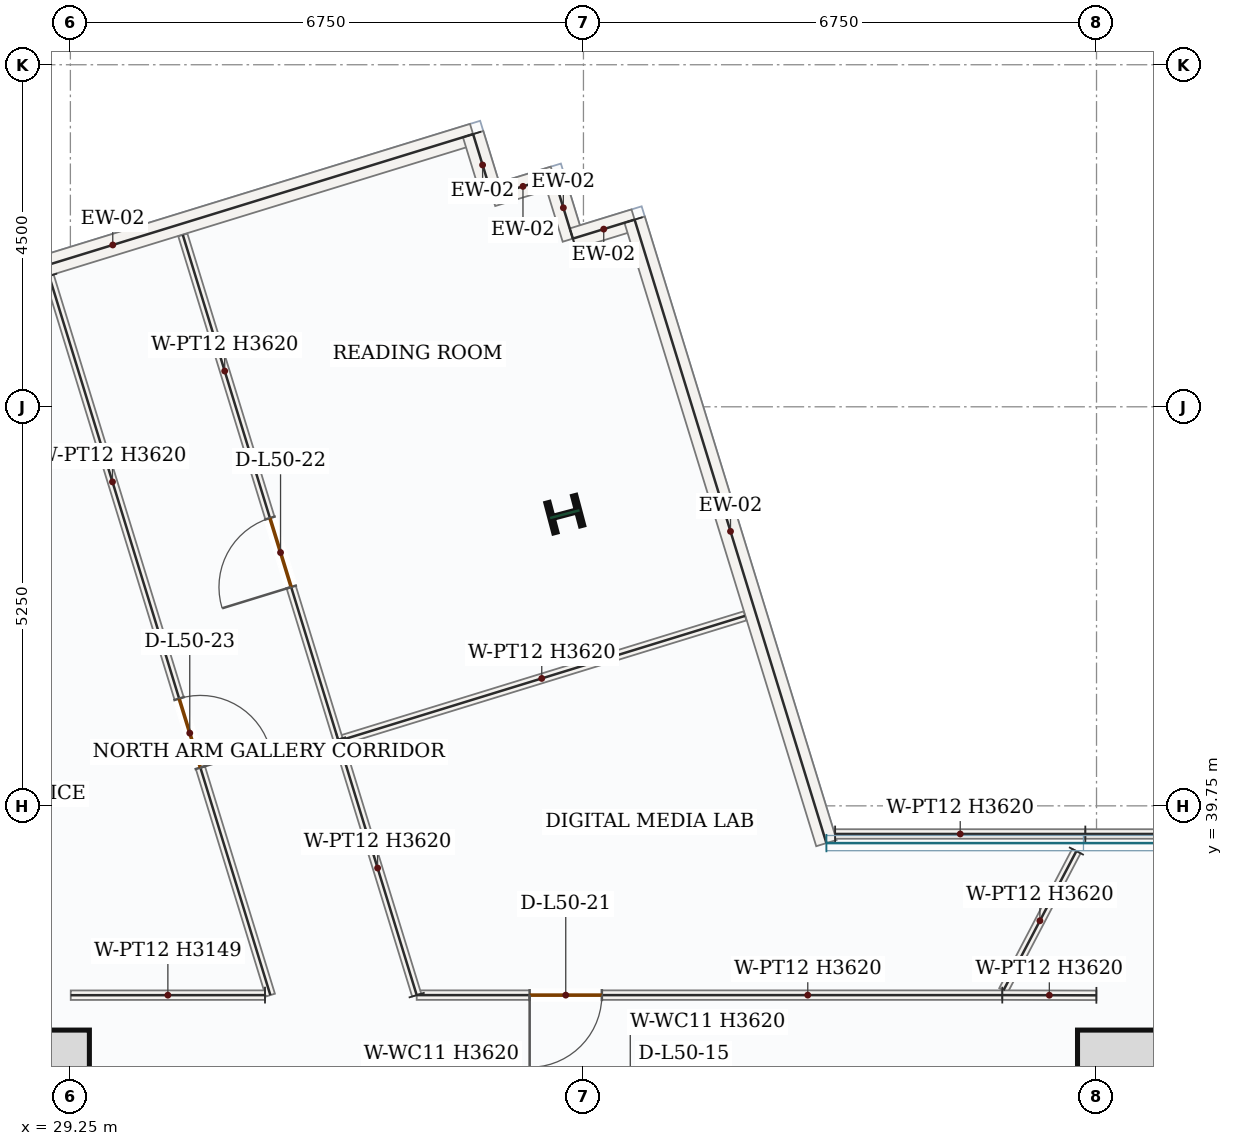
"""IFC4 building model, lengths in metres.
Left out: names, types, materials, properties, quantities, classifications, styles, units other than length and angle.
Written with IfcOpenShell. Run it as: python <this file> out.ifc"""

import sys

from ifc_helpers import new_model, si_unit, direction, frame, frame_2d, origin, origin_2d, place, context, subcontext, project, spatial, rectangle, i_section, extrude, source, transform, mapped, element, fill, save


model = new_model("IFC4")
c1 = context("Model", 3, precision=1e-05, world=origin(), true_north=direction((0.0, 1.0)))
c2 = subcontext(c1, "Body", "Model", "MODEL_VIEW")
j1 = project(units=[si_unit("LENGTHUNIT", "METRE"), si_unit("PLANEANGLEUNIT", "RADIAN")], contexts=[c1])
p1 = place(None, origin())
s1 = spatial("IfcSite", under=j1, at=p1, CompositionType="ELEMENT")
p2 = place(p1, origin())
s2 = spatial("IfcBuilding", under=s1, at=p2, CompositionType="ELEMENT")
p3 = place(p2, frame((0.0, 0.0, 213.6)))
s3 = spatial("IfcBuildingStorey", under=s2, at=p3, CompositionType="ELEMENT", Elevation=213.6)
p4 = place(p3, frame((29.0, 28.05, 0.0), z_axis=(0.0, 0.0, 1.0), x_axis=(0.0, 1.0, 0.0)))
e1 = element("IfcWall", 1, at=p4, inside=s3, PredefinedType="SHEAR", context=c2, shape_type="SweptSolid", body=[
    extrude(rectangle(XDim=8.55, YDim=0.5, at=frame_2d((4.275, 0.0))), origin(), (0.0, 0.0, 1.0), 3.62),
])
p5 = place(p4, frame((1.5, 0.0, 0.0)))
e2 = element("IfcOpeningElement", 2, at=p5, cuts=e1, PredefinedType="OPENING", context=c2, shape_type="SweptSolid", body=[
    extrude(rectangle(XDim=1.1, YDim=2.2, at=frame_2d((0.55, 1.1))), frame((0.0, 0.26, 0.0), z_axis=(0.0, -1.0, 0.0), x_axis=(1.0, 0.0, 0.0)), (0.0, 0.0, 1.0), 0.52),
])
p6 = place(p3, frame((43.0, 28.05, 0.0), z_axis=(0.0, 0.0, 1.0), x_axis=(0.0, 1.0, 0.0)))
e3 = element("IfcWall", 3, at=p6, inside=s3, PredefinedType="SHEAR", context=c2, shape_type="SweptSolid", body=[
    extrude(rectangle(XDim=8.55, YDim=0.5, at=frame_2d((4.275, 0.0))), origin(), (0.0, 0.0, 1.0), 3.62),
])
p7 = place(p6, frame((1.5, 0.0, 0.0)))
e4 = element("IfcOpeningElement", 4, at=p7, cuts=e3, PredefinedType="OPENING", context=c2, shape_type="SweptSolid", body=[
    extrude(rectangle(XDim=1.1, YDim=2.2, at=frame_2d((0.55, 1.1))), frame((0.0, 0.26, 0.0), z_axis=(0.0, -1.0, 0.0), x_axis=(1.0, 0.0, 0.0)), (0.0, 0.0, 1.0), 0.52),
])
m1 = source(origin(), c2, "Body", "SweptSolid", [
    extrude(rectangle(XDim=7.0, YDim=0.5, at=frame_2d((3.5, 0.0))), origin(), (0.0, 0.0, 1.0), 3.62),
])
p8 = place(p3, frame((43.25, 36.35, 0.0), z_axis=(0.0, 0.0, 1.0), x_axis=(1.0, 0.0, 0.0)))
e5 = element("IfcWall", 5, at=p8, inside=s3, PredefinedType="SHEAR", context=c2, shape_type="MappedRepresentation", body=[
    mapped(m1, transform((0.0, 0.0, 0.0), x_axis=(1.0, 0.0, 0.0), y_axis=(0.0, 1.0, 0.0), z_axis=(0.0, 0.0, 1.0), scale=1.0)),
])
m2 = source(origin(), c2, "Body", "SweptSolid", [
    extrude(rectangle(XDim=1.2, YDim=1.2, at=origin_2d()), origin(), (0.0, 0.0, 1.0), 3.9),
])
for number, where, z_axis, x_axis in (
    (6, (28.9, 36.2, 0.0), (0.0, 0.0, 1.0), (1.0, 0.0, 0.0)),
    (7, (43.1, 36.2, 0.0), (0.0, 0.0, 1.0), (1.0, 0.0, 0.0)),
):
    element("IfcColumn", number, at=place(p3, frame(where, z_axis=z_axis, x_axis=x_axis)), inside=s3, PredefinedType="COLUMN", context=c2, shape_type="MappedRepresentation", body=[
        mapped(m2, transform((0.0, 0.0, 0.0), x_axis=(1.0, 0.0, 0.0), y_axis=(0.0, 1.0, 0.0), z_axis=(0.0, 0.0, 1.0), scale=1.0)),
    ])
m3 = source(origin(), c2, "Body", "SweptSolid", [
    extrude(i_section(OverallWidth=0.404, OverallDepth=0.407, WebThickness=0.027, FlangeThickness=0.044, FilletRadius=0.018, at=origin_2d()), origin(), (0.0, 0.0, 1.0), 3.9),
])
p9 = place(p3, frame((35.755, 43.588, 0.0), z_axis=(0.0, 0.0, 1.0), x_axis=(-0.255445757936, 0.966823388604, 0.0)))
e8 = element("IfcColumn", 8, at=p9, inside=s3, PredefinedType="COLUMN", context=c2, shape_type="MappedRepresentation", body=[
    mapped(m3, transform((0.0, 0.0, 0.0), x_axis=(1.0, 0.0, 0.0), y_axis=(0.0, 1.0, 0.0), z_axis=(0.0, 0.0, 1.0), scale=1.0)),
])
m4 = source(origin(), c2, "Body", "SweptSolid", [
    extrude(rectangle(XDim=9.92, YDim=0.28, at=frame_2d((4.96, 0.0))), origin(), (0.0, 0.0, 1.0), 3.62),
])
p10 = place(p3, frame((25.067, 45.671, 0.0), z_axis=(0.0, 0.0, 1.0), x_axis=(0.955796567368, 0.294028777175, 0.0)))
e9 = element("IfcWall", 9, at=p10, inside=s3, PredefinedType="SOLIDWALL", context=c2, shape_type="MappedRepresentation", body=[
    mapped(m4, transform((0.0, 0.0, 0.0), x_axis=(1.0, 0.0, 0.0), y_axis=(0.0, 1.0, 0.0), z_axis=(0.0, 0.0, 1.0), scale=1.0)),
])
m5 = source(origin(), c2, "Body", "SweptSolid", [
    extrude(rectangle(XDim=0.85, YDim=0.28, at=frame_2d((0.425, 0.0))), origin(), (0.0, 0.0, 1.0), 3.62),
])
for number, where, z_axis, x_axis in (
    (10, (34.548, 48.587, 0.0), (0.0, 0.0, 1.0), (0.294, -0.956, 0.0)),
    (11, (34.798, 47.775, 0.0), (0.0, 0.0, 1.0), (0.956, 0.294, 0.0)),
    (12, (35.611, 48.025, 0.0), (0.0, 0.0, 1.0), (0.294, -0.956, 0.0)),
    (13, (35.861, 47.212, 0.0), (0.0, 0.0, 1.0), (0.956, 0.294, 0.0)),
):
    element("IfcWall", number, at=place(p3, frame(where, z_axis=z_axis, x_axis=x_axis)), inside=s3, PredefinedType="SOLIDWALL", context=c2, shape_type="MappedRepresentation", body=[
        mapped(m5, transform((0.0, 0.0, 0.0), x_axis=(1.0, 0.0, 0.0), y_axis=(0.0, 1.0, 0.0), z_axis=(0.0, 0.0, 1.0), scale=1.0)),
    ])
m6 = source(origin(), c2, "Body", "SweptSolid", [
    extrude(rectangle(XDim=8.582, YDim=0.28, at=frame_2d((4.291, 0.0))), origin(), (0.0, 0.0, 1.0), 3.62),
])
p11 = place(p3, frame((36.673, 47.462, 0.0), z_axis=(0.0, 0.0, 1.0), x_axis=(0.294019877333, -0.955799305154, 0.0)))
e14 = element("IfcWall", 14, at=p11, inside=s3, PredefinedType="SOLIDWALL", context=c2, shape_type="MappedRepresentation", body=[
    mapped(m6, transform((0.0, 0.0, 0.0), x_axis=(1.0, 0.0, 0.0), y_axis=(0.0, 1.0, 0.0), z_axis=(0.0, 0.0, 1.0), scale=1.0)),
])
p12 = place(p3, frame((41.51, 37.26, 0.0), z_axis=(0.0, 0.0, 1.0), x_axis=(-1.0, 0.0, 0.0)))
e15 = element("IfcWall", 15, at=p12, inside=s3, PredefinedType="PARTITIONING", context=c2, shape_type="SweptSolid", body=[
    extrude(rectangle(XDim=7.704, YDim=0.125, at=frame_2d((3.852, 0.0))), origin(), (0.0, 0.0, 1.0), 3.62),
])
p13 = place(p12, frame((5.268, 0.0, 0.0)))
e16 = element("IfcOpeningElement", 16, at=p13, cuts=e15, PredefinedType="OPENING", context=c2, shape_type="SweptSolid", body=[
    extrude(rectangle(XDim=0.95, YDim=2.15, at=frame_2d((0.475, 1.075))), frame((0.0, 0.073, 0.0), z_axis=(0.0, -1.0, 0.0), x_axis=(1.0, 0.0, 0.0)), (0.0, 0.0, 1.0), 0.145),
])
m7 = source(origin(), c2, "Body", "SweptSolid", [
    extrude(rectangle(XDim=3.498, YDim=0.125, at=frame_2d((1.749, 0.0))), origin(), (0.0, 0.0, 1.0), 3.62),
])
p14 = place(p3, frame((33.806, 37.26, 0.0), z_axis=(0.0, 0.0, 1.0), x_axis=(-0.294012288782, 0.955801639487, 0.0)))
e17 = element("IfcWall", 17, at=p14, inside=s3, PredefinedType="PARTITIONING", context=c2, shape_type="MappedRepresentation", body=[
    mapped(m7, transform((0.0, 0.0, 0.0), x_axis=(1.0, 0.0, 0.0), y_axis=(0.0, 1.0, 0.0), z_axis=(0.0, 0.0, 1.0), scale=1.0)),
])
m8 = source(origin(), c2, "Body", "SweptSolid", [
    extrude(rectangle(XDim=5.595, YDim=0.125, at=frame_2d((2.797, 0.0))), origin(), (0.0, 0.0, 1.0), 3.62),
])
p15 = place(p3, frame((32.778, 40.604, 0.0), z_axis=(0.0, 0.0, 1.0), x_axis=(0.955787499516, 0.294058252339, 0.0)))
e18 = element("IfcWall", 18, at=p15, inside=s3, PredefinedType="PARTITIONING", context=c2, shape_type="MappedRepresentation", body=[
    mapped(m8, transform((0.0, 0.0, 0.0), x_axis=(1.0, 0.0, 0.0), y_axis=(0.0, 1.0, 0.0), z_axis=(0.0, 0.0, 1.0), scale=1.0)),
])
m9 = source(origin(), c2, "Body", "SweptSolid", [
    extrude(rectangle(XDim=3.292, YDim=0.125, at=frame_2d((1.646, 0.0))), origin(), (0.0, 0.0, 1.0), 3.62),
])
p16 = place(p3, frame((39.311, 39.38, 0.0), z_axis=(0.0, 0.0, 1.0), x_axis=(1.0, 0.0, 0.0)))
e19 = element("IfcWall", 19, at=p16, inside=s3, PredefinedType="PARTITIONING", context=c2, shape_type="MappedRepresentation", body=[
    mapped(m9, transform((0.0, 0.0, 0.0), x_axis=(1.0, 0.0, 0.0), y_axis=(0.0, 1.0, 0.0), z_axis=(0.0, 0.0, 1.0), scale=1.0)),
])
m10 = source(origin(), c2, "Body", "SweptSolid", [
    extrude(rectangle(XDim=2.069, YDim=0.125, at=frame_2d((1.035, 0.0))), origin(), (0.0, 0.0, 1.0), 3.62),
])
p17 = place(p3, frame((42.485, 39.155, 0.0), z_axis=(0.0, 0.0, 1.0), x_axis=(-0.46379536588, -0.885942356244, 0.0)))
e20 = element("IfcWall", 20, at=p17, inside=s3, PredefinedType="PARTITIONING", context=c2, shape_type="MappedRepresentation", body=[
    mapped(m10, transform((0.0, 0.0, 0.0), x_axis=(1.0, 0.0, 0.0), y_axis=(0.0, 1.0, 0.0), z_axis=(0.0, 0.0, 1.0), scale=1.0)),
])
p18 = place(p3, frame((32.771, 40.623, 0.0), z_axis=(0.0, 0.0, 1.0), x_axis=(-0.294016682873, 0.955800287818, 0.0)))
e21 = element("IfcWall", 21, at=p18, inside=s3, PredefinedType="PARTITIONING", context=c2, shape_type="SweptSolid", body=[
    extrude(rectangle(XDim=6.945, YDim=0.125, at=frame_2d((3.473, 0.0))), origin(), (0.0, 0.0, 1.0), 3.62),
])
p19 = place(p18, frame((2.098, 0.0, 0.0)))
e22 = element("IfcOpeningElement", 22, at=p19, cuts=e21, PredefinedType="OPENING", context=c2, shape_type="SweptSolid", body=[
    extrude(rectangle(XDim=0.95, YDim=2.15, at=frame_2d((0.475, 1.075))), frame((0.0, 0.073, 0.0), z_axis=(0.0, -1.0, 0.0), x_axis=(1.0, 0.0, 0.0)), (0.0, 0.0, 1.0), 0.145),
])
m11 = source(origin(), c2, "Body", "SweptSolid", [
    extrude(rectangle(XDim=1.238, YDim=0.125, at=frame_2d((0.619, 0.0))), origin(), (0.0, 0.0, 1.0), 3.62),
])
p20 = place(p3, frame((42.748, 37.257, 0.0), z_axis=(0.0, 0.0, 1.0), x_axis=(-0.9999976473, 0.002169192293, 0.0)))
e23 = element("IfcWall", 23, at=p20, inside=s3, PredefinedType="PARTITIONING", context=c2, shape_type="MappedRepresentation", body=[
    mapped(m11, transform((0.0, 0.0, 0.0), x_axis=(1.0, 0.0, 0.0), y_axis=(0.0, 1.0, 0.0), z_axis=(0.0, 0.0, 1.0), scale=1.0)),
])
m12 = source(origin(), c2, "Body", "SweptSolid", [
    extrude(rectangle(XDim=6.789, YDim=0.125, at=frame_2d((3.395, 0.0))), origin(), (0.0, 0.0, 1.0), 3.62),
])
p21 = place(p3, frame((42.603, 39.38, 0.0), z_axis=(0.0, 0.0, 1.0), x_axis=(1.0, 0.0, 0.0)))
e24 = element("IfcWall", 24, at=p21, inside=s3, PredefinedType="PARTITIONING", context=c2, shape_type="MappedRepresentation", body=[
    mapped(m12, transform((0.0, 0.0, 0.0), x_axis=(1.0, 0.0, 0.0), y_axis=(0.0, 1.0, 0.0), z_axis=(0.0, 0.0, 1.0), scale=1.0)),
])
p22 = place(p3, frame((28.971, 46.72, 0.0), z_axis=(0.0, 0.0, 1.0), x_axis=(0.294052915152, -0.955789141542, 0.0)))
e25 = element("IfcWall", 25, at=p22, inside=s3, PredefinedType="PARTITIONING", context=c2, shape_type="SweptSolid", body=[
    extrude(rectangle(XDim=9.897, YDim=0.125, at=frame_2d((4.949, 0.0))), origin(), (0.0, 0.0, 1.0), 3.62),
])
p23 = place(p22, frame((5.816, 0.0, 0.0)))
e26 = element("IfcOpeningElement", 26, at=p23, cuts=e25, PredefinedType="OPENING", context=c2, shape_type="SweptSolid", body=[
    extrude(rectangle(XDim=0.95, YDim=2.15, at=frame_2d((0.475, 1.075))), frame((0.0, 0.073, 0.0), z_axis=(0.0, -1.0, 0.0), x_axis=(1.0, 0.0, 0.0)), (0.0, 0.0, 1.0), 0.145),
])
m13 = source(origin(), c2, "Body", "SweptSolid", [
    extrude(rectangle(XDim=2.555, YDim=0.125, at=frame_2d((1.278, 0.0))), origin(), (0.0, 0.0, 1.0), 3.149),
])
p24 = place(p3, frame((31.81, 37.26, 0.0), z_axis=(0.0, 0.0, 1.0), x_axis=(-0.999999885905, -0.000477691739, 0.0)))
e27 = element("IfcWall", 27, at=p24, inside=s3, PredefinedType="PARTITIONING", context=c2, shape_type="MappedRepresentation", body=[
    mapped(m13, transform((0.0, 0.0, 0.0), x_axis=(1.0, 0.0, 0.0), y_axis=(0.0, 1.0, 0.0), z_axis=(0.0, 0.0, 1.0), scale=1.0)),
])
m14 = source(origin(), c2, "Body", "SweptSolid", [
    extrude(rectangle(XDim=0.95, YDim=2.15, at=frame_2d((0.475, 1.075))), frame((0.0, 0.025, 0.0), z_axis=(0.0, -1.0, 0.0), x_axis=(1.0, 0.0, 0.0)), (0.0, 0.0, 1.0), 0.05),
])
p25 = place(p13, origin())
e28 = element("IfcDoor", 28, at=p25, inside=s3, OperationType="SINGLE_SWING_RIGHT", PredefinedType="DOOR", context=c2, shape_type="MappedRepresentation", body=[
    mapped(m14, transform((0.0, 0.0, 0.0), x_axis=(1.0, 0.0, 0.0), y_axis=(0.0, 1.0, 0.0), z_axis=(0.0, 0.0, 1.0), scale=1.0)),
])
fill(e16, e28)
p26 = place(p19, origin())
e29 = element("IfcDoor", 29, at=p26, inside=s3, OperationType="SINGLE_SWING_LEFT", PredefinedType="DOOR", context=c2, shape_type="MappedRepresentation", body=[
    mapped(m14, transform((0.0, 0.0, 0.0), x_axis=(1.0, 0.0, 0.0), y_axis=(0.0, 1.0, 0.0), z_axis=(0.0, 0.0, 1.0), scale=1.0)),
])
fill(e22, e29)
p27 = place(p23, origin())
e30 = element("IfcDoor", 30, at=p27, inside=s3, OperationType="SINGLE_SWING_RIGHT", PredefinedType="DOOR", context=c2, shape_type="MappedRepresentation", body=[
    mapped(m14, transform((0.0, 0.0, 0.0), x_axis=(1.0, 0.0, 0.0), y_axis=(0.0, 1.0, 0.0), z_axis=(0.0, 0.0, 1.0), scale=1.0)),
])
fill(e26, e30)
save(model, sys.argv[1])
